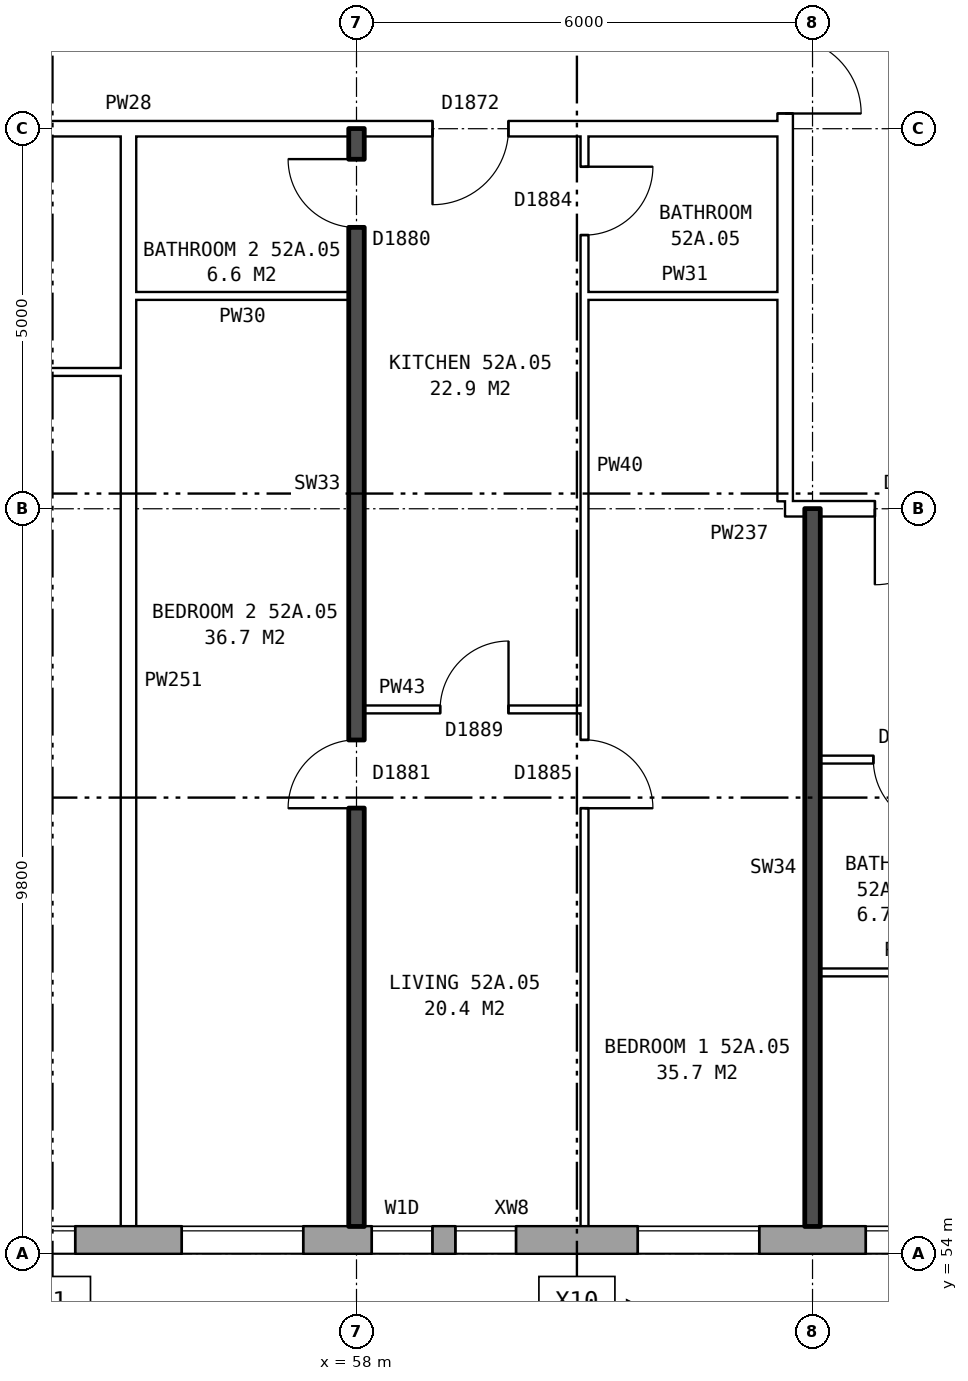
"""IFC4 building model, lengths in metres.
Left out: names, types, materials, properties, quantities, classifications, styles, units other than length and angle.
Written with IfcOpenShell. Run it as: python <this file> out.ifc"""

import sys

from ifc_helpers import new_model, si_unit, direction, frame, frame_2d, origin, place, context, subcontext, project, spatial, rectangle, extrude, element, fill, save


model = new_model("IFC4")
c1 = context("Model", 3, precision=1e-05, world=origin(), true_north=direction((0.0, 1.0)))
c2 = subcontext(c1, "Body", "Model", "MODEL_VIEW")
j1 = project(units=[si_unit("LENGTHUNIT", "METRE"), si_unit("PLANEANGLEUNIT", "RADIAN")], contexts=[c1])
p1 = place(None, origin())
s1 = spatial("IfcSite", under=j1, at=p1, CompositionType="ELEMENT")
p2 = place(p1, origin())
s2 = spatial("IfcBuilding", under=s1, at=p2, CompositionType="ELEMENT")
p3 = place(p2, frame((0.0, 0.0, 185.1)))
s3 = spatial("IfcBuildingStorey", under=s2, at=p3, CompositionType="ELEMENT", Elevation=185.1)
p4 = place(p3, frame((33.325, 54.18, 0.0), z_axis=(0.0, 0.0, 1.0), x_axis=(1.0, 0.0, 0.0)))
e1 = element("IfcWall", 1, at=p4, inside=s3, PredefinedType="STANDARD", context=c2, shape_type="SweptSolid", body=[
    extrude(rectangle(XDim=39.601, YDim=0.36, at=frame_2d((19.8, 0.0))), origin(), (0.0, 0.0, 1.0), 2.85),
])
p5 = place(p4, frame((1.375, 0.0, 0.8)))
e2 = element("IfcOpeningElement", 2, at=p5, cuts=e1, PredefinedType="OPENING", context=c2, shape_type="SweptSolid", body=[
    extrude(rectangle(XDim=1.6, YDim=1.8, at=frame_2d((0.8, 0.9))), frame((0.0, 0.19, 0.0), z_axis=(0.0, -1.0, 0.0), x_axis=(1.0, 0.0, 0.0)), (0.0, 0.0, 1.0), 0.38),
])
p6 = place(p4, frame((4.375, 0.0, 0.8)))
e3 = element("IfcOpeningElement", 3, at=p6, cuts=e1, PredefinedType="OPENING", context=c2, shape_type="SweptSolid", body=[
    extrude(rectangle(XDim=1.6, YDim=1.8, at=frame_2d((0.8, 0.9))), frame((0.0, 0.19, 0.0), z_axis=(0.0, -1.0, 0.0), x_axis=(1.0, 0.0, 0.0)), (0.0, 0.0, 1.0), 0.38),
])
p7 = place(p4, frame((7.375, 0.0, 0.8)))
e4 = element("IfcOpeningElement", 4, at=p7, cuts=e1, PredefinedType="OPENING", context=c2, shape_type="SweptSolid", body=[
    extrude(rectangle(XDim=1.6, YDim=1.8, at=frame_2d((0.8, 0.9))), frame((0.0, 0.19, 0.0), z_axis=(0.0, -1.0, 0.0), x_axis=(1.0, 0.0, 0.0)), (0.0, 0.0, 1.0), 0.38),
])
p8 = place(p4, frame((9.275, 0.0, 0.8)))
e5 = element("IfcOpeningElement", 5, at=p8, cuts=e1, PredefinedType="OPENING", context=c2, shape_type="SweptSolid", body=[
    extrude(rectangle(XDim=1.6, YDim=1.8, at=frame_2d((0.8, 0.9))), frame((0.0, 0.19, 0.0), z_axis=(0.0, -1.0, 0.0), x_axis=(1.0, 0.0, 0.0)), (0.0, 0.0, 1.0), 0.38),
])
p9 = place(p4, frame((13.075, 0.0, 0.8)))
e6 = element("IfcOpeningElement", 6, at=p9, cuts=e1, PredefinedType="OPENING", context=c2, shape_type="SweptSolid", body=[
    extrude(rectangle(XDim=0.6, YDim=0.9, at=frame_2d((0.3, 0.45))), frame((0.0, 0.19, 0.0), z_axis=(0.0, -1.0, 0.0), x_axis=(1.0, 0.0, 0.0)), (0.0, 0.0, 1.0), 0.38),
])
p10 = place(p4, frame((16.375, 0.0, 0.8)))
e7 = element("IfcOpeningElement", 7, at=p10, cuts=e1, PredefinedType="OPENING", context=c2, shape_type="SweptSolid", body=[
    extrude(rectangle(XDim=1.6, YDim=1.8, at=frame_2d((0.8, 0.9))), frame((0.0, 0.19, 0.0), z_axis=(0.0, -1.0, 0.0), x_axis=(1.0, 0.0, 0.0)), (0.0, 0.0, 1.0), 0.38),
])
p11 = place(p4, frame((19.375, 0.0, 0.8)))
e8 = element("IfcOpeningElement", 8, at=p11, cuts=e1, PredefinedType="OPENING", context=c2, shape_type="SweptSolid", body=[
    extrude(rectangle(XDim=1.6, YDim=1.8, at=frame_2d((0.8, 0.9))), frame((0.0, 0.19, 0.0), z_axis=(0.0, -1.0, 0.0), x_axis=(1.0, 0.0, 0.0)), (0.0, 0.0, 1.0), 0.38),
])
p12 = place(p4, frame((22.375, 0.0, 0.8)))
e9 = element("IfcOpeningElement", 9, at=p12, cuts=e1, PredefinedType="OPENING", context=c2, shape_type="SweptSolid", body=[
    extrude(rectangle(XDim=1.6, YDim=1.8, at=frame_2d((0.8, 0.9))), frame((0.0, 0.19, 0.0), z_axis=(0.0, -1.0, 0.0), x_axis=(1.0, 0.0, 0.0)), (0.0, 0.0, 1.0), 0.38),
])
p13 = place(p4, frame((24.875, 0.0, 0.75)))
e10 = element("IfcOpeningElement", 10, at=p13, cuts=e1, PredefinedType="OPENING", context=c2, shape_type="SweptSolid", body=[
    extrude(rectangle(XDim=0.8, YDim=1.8, at=frame_2d((0.4, 0.9))), frame((0.0, 0.19, 0.0), z_axis=(0.0, -1.0, 0.0), x_axis=(1.0, 0.0, 0.0)), (0.0, 0.0, 1.0), 0.38),
])
p14 = place(p4, frame((28.375, 0.0, 0.8)))
e11 = element("IfcOpeningElement", 11, at=p14, cuts=e1, PredefinedType="OPENING", context=c2, shape_type="SweptSolid", body=[
    extrude(rectangle(XDim=1.6, YDim=1.8, at=frame_2d((0.8, 0.9))), frame((0.0, 0.19, 0.0), z_axis=(0.0, -1.0, 0.0), x_axis=(1.0, 0.0, 0.0)), (0.0, 0.0, 1.0), 0.38),
])
p15 = place(p4, frame((31.375, 0.0, 0.8)))
e12 = element("IfcOpeningElement", 12, at=p15, cuts=e1, PredefinedType="OPENING", context=c2, shape_type="SweptSolid", body=[
    extrude(rectangle(XDim=1.6, YDim=1.8, at=frame_2d((0.8, 0.9))), frame((0.0, 0.19, 0.0), z_axis=(0.0, -1.0, 0.0), x_axis=(1.0, 0.0, 0.0)), (0.0, 0.0, 1.0), 0.38),
])
p16 = place(p4, frame((34.375, 0.0, 0.8)))
e13 = element("IfcOpeningElement", 13, at=p16, cuts=e1, PredefinedType="OPENING", context=c2, shape_type="SweptSolid", body=[
    extrude(rectangle(XDim=1.6, YDim=1.8, at=frame_2d((0.8, 0.9))), frame((0.0, 0.19, 0.0), z_axis=(0.0, -1.0, 0.0), x_axis=(1.0, 0.0, 0.0)), (0.0, 0.0, 1.0), 0.38),
])
p17 = place(p4, frame((37.375, 0.0, 0.8)))
e14 = element("IfcOpeningElement", 14, at=p17, cuts=e1, PredefinedType="OPENING", context=c2, shape_type="SweptSolid", body=[
    extrude(rectangle(XDim=1.6, YDim=1.8, at=frame_2d((0.8, 0.9))), frame((0.0, 0.19, 0.0), z_axis=(0.0, -1.0, 0.0), x_axis=(1.0, 0.0, 0.0)), (0.0, 0.0, 1.0), 0.38),
])
p18 = place(p4, frame((11.175, 0.0, 1.7)))
e15 = element("IfcOpeningElement", 15, at=p18, cuts=e1, PredefinedType="OPENING", context=c2, shape_type="SweptSolid", body=[
    extrude(rectangle(XDim=0.8, YDim=0.9, at=frame_2d((0.4, 0.45))), frame((0.0, 0.19, 0.0), z_axis=(0.0, -1.0, 0.0), x_axis=(1.0, 0.0, 0.0)), (0.0, 0.0, 1.0), 0.38),
])
p19 = place(p4, frame((13.975, 0.0, 0.8)))
e16 = element("IfcOpeningElement", 16, at=p19, cuts=e1, PredefinedType="OPENING", context=c2, shape_type="SweptSolid", body=[
    extrude(rectangle(XDim=1.4, YDim=1.8, at=frame_2d((0.7, 0.9))), frame((0.0, 0.19, 0.0), z_axis=(0.0, -1.0, 0.0), x_axis=(1.0, 0.0, 0.0)), (0.0, 0.0, 1.0), 0.38),
])
p20 = place(p4, frame((25.975, 0.0, 0.55)))
e17 = element("IfcOpeningElement", 17, at=p20, cuts=e1, PredefinedType="OPENING", context=c2, shape_type="SweptSolid", body=[
    extrude(rectangle(XDim=0.8, YDim=0.9, at=frame_2d((0.4, 0.45))), frame((0.0, 0.19, 0.0), z_axis=(0.0, -1.0, 0.0), x_axis=(1.0, 0.0, 0.0)), (0.0, 0.0, 1.0), 0.38),
])
p21 = place(p3, frame((63.64, 63.9, 0.0), z_axis=(0.0, 0.0, 1.0), x_axis=(0.0, 1.0, 0.0)))
e18 = element("IfcWall", 18, at=p21, inside=s3, PredefinedType="PARTITIONING", context=c2, shape_type="SweptSolid", body=[
    extrude(rectangle(XDim=12.2, YDim=0.2, at=frame_2d((6.1, 0.0))), origin(), (0.0, 0.0, 1.0), 2.85),
])
p22 = place(p21, frame((5.1, 0.0, 0.0)))
e19 = element("IfcOpeningElement", 19, at=p22, cuts=e18, PredefinedType="OPENING", context=c2, shape_type="SweptSolid", body=[
    extrude(rectangle(XDim=2.0, YDim=2.1, at=frame_2d((1.0, 1.05))), frame((0.0, 0.11, 0.0), z_axis=(0.0, -1.0, 0.0), x_axis=(1.0, 0.0, 0.0)), (0.0, 0.0, 1.0), 0.22),
])
p23 = place(p3, frame((64.1, 57.7, 0.0), z_axis=(0.0, 0.0, 1.0), x_axis=(1.0, 0.0, 0.0)))
e20 = element("IfcWall", 20, at=p23, inside=s3, PredefinedType="PARTITIONING", context=c2, shape_type="SweptSolid", body=[
    extrude(rectangle(XDim=2.3, YDim=0.1, at=frame_2d((1.15, 0.0))), origin(), (0.0, 0.0, 1.0), 2.85),
])
p24 = place(p3, frame((64.1, 60.5, 0.0), z_axis=(0.0, 0.0, 1.0), x_axis=(1.0, 0.0, 0.0)))
e21 = element("IfcWall", 21, at=p24, inside=s3, PredefinedType="PARTITIONING", context=c2, shape_type="SweptSolid", body=[
    extrude(rectangle(XDim=5.8, YDim=0.1, at=frame_2d((2.9, 0.0))), origin(), (0.0, 0.0, 1.0), 2.85),
])
p25 = place(p24, frame((3.6, 0.0, 0.0)))
e22 = element("IfcOpeningElement", 22, at=p25, cuts=e21, PredefinedType="OPENING", context=c2, shape_type="SweptSolid", body=[
    extrude(rectangle(XDim=0.9, YDim=2.1, at=frame_2d((0.45, 1.05))), frame((0.0, 0.06, 0.0), z_axis=(0.0, -1.0, 0.0), x_axis=(1.0, 0.0, 0.0)), (0.0, 0.0, 1.0), 0.12),
])
p26 = place(p24, frame((0.7, 0.0, 0.0)))
e23 = element("IfcOpeningElement", 23, at=p26, cuts=e21, PredefinedType="OPENING", context=c2, shape_type="SweptSolid", body=[
    extrude(rectangle(XDim=0.9, YDim=2.1, at=frame_2d((0.45, 1.05))), frame((0.0, 0.06, 0.0), z_axis=(0.0, -1.0, 0.0), x_axis=(1.0, 0.0, 0.0)), (0.0, 0.0, 1.0), 0.12),
])
p27 = place(p3, frame((58.1, 61.16, 0.0), z_axis=(0.0, 0.0, 1.0), x_axis=(1.0, 0.0, 0.0)))
e24 = element("IfcWall", 24, at=p27, inside=s3, PredefinedType="PARTITIONING", context=c2, shape_type="SweptSolid", body=[
    extrude(rectangle(XDim=2.9, YDim=0.1, at=frame_2d((1.45, 0.0))), origin(), (0.0, 0.0, 1.0), 2.85),
])
p28 = place(p27, frame((1.0, 0.0, 0.0)))
e25 = element("IfcOpeningElement", 25, at=p28, cuts=e24, PredefinedType="OPENING", context=c2, shape_type="SweptSolid", body=[
    extrude(rectangle(XDim=0.9, YDim=2.1, at=frame_2d((0.45, 1.05))), frame((0.0, 0.06, 0.0), z_axis=(0.0, -1.0, 0.0), x_axis=(1.0, 0.0, 0.0)), (0.0, 0.0, 1.0), 0.12),
])
p29 = place(p3, frame((63.64, 63.8, 0.0), z_axis=(0.0, 0.0, 1.0), x_axis=(1.0, 0.0, 0.0)))
e26 = element("IfcWall", 26, at=p29, inside=s3, PredefinedType="PARTITIONING", context=c2, shape_type="SweptSolid", body=[
    extrude(rectangle(XDim=3.0, YDim=0.2, at=frame_2d((1.5, 0.0))), origin(), (0.0, 0.0, 1.0), 2.85),
])
p30 = place(p29, frame((1.18, 0.0, 0.0)))
e27 = element("IfcOpeningElement", 27, at=p30, cuts=e26, PredefinedType="OPENING", context=c2, shape_type="SweptSolid", body=[
    extrude(rectangle(XDim=1.0, YDim=2.1, at=frame_2d((0.5, 1.05))), frame((0.0, 0.11, 0.0), z_axis=(0.0, -1.0, 0.0), x_axis=(1.0, 0.0, 0.0)), (0.0, 0.0, 1.0), 0.22),
])
for number, where, z_axis, x_axis in (
    (28, (52.1, 65.6, 0.0), (0.0, 0.0, 1.0), (1.0, 0.0, 0.0)),
    (29, (55.1, 66.6, 0.0), (0.0, 0.0, 1.0), (1.0, 0.0, 0.0)),
):
    element("IfcWall", number, at=place(p3, frame(where, z_axis=z_axis, x_axis=x_axis)), inside=s3, PredefinedType="PARTITIONING", context=c2, shape_type="SweptSolid", body=[
        extrude(rectangle(XDim=2.8, YDim=0.1, at=frame_2d((1.4, 0.0))), origin(), (0.0, 0.0, 1.0), 2.85),
    ])
p31 = place(p3, frame((61.0, 66.6, 0.0), z_axis=(0.0, 0.0, 1.0), x_axis=(1.0, 0.0, 0.0)))
e30 = element("IfcWall", 30, at=p31, inside=s3, PredefinedType="PARTITIONING", context=c2, shape_type="SweptSolid", body=[
    extrude(rectangle(XDim=2.64, YDim=0.1, at=frame_2d((1.32, 0.0))), origin(), (0.0, 0.0, 1.0), 2.85),
])
p32 = place(p3, frame((44.36, 68.8, 0.0), z_axis=(0.0, 0.0, 1.0), x_axis=(1.0, 0.0, 0.0)))
e31 = element("IfcWall", 31, at=p32, inside=s3, PredefinedType="PARTITIONING", context=c2, shape_type="SweptSolid", body=[
    extrude(rectangle(XDim=19.28, YDim=0.2, at=frame_2d((9.64, 0.0))), origin(), (0.0, 0.0, 1.0), 2.85),
])
p33 = place(p32, frame((14.64, 0.0, 0.0)))
e32 = element("IfcOpeningElement", 32, at=p33, cuts=e31, PredefinedType="OPENING", context=c2, shape_type="SweptSolid", body=[
    extrude(rectangle(XDim=1.0, YDim=2.1, at=frame_2d((0.5, 1.05))), frame((0.0, 0.11, 0.0), z_axis=(0.0, -1.0, 0.0), x_axis=(1.0, 0.0, 0.0)), (0.0, 0.0, 1.0), 0.22),
])
p34 = place(p32, frame((5.64, 0.0, 0.0)))
e33 = element("IfcOpeningElement", 33, at=p34, cuts=e31, PredefinedType="OPENING", context=c2, shape_type="SweptSolid", body=[
    extrude(rectangle(XDim=1.0, YDim=2.1, at=frame_2d((0.5, 1.05))), frame((0.0, 0.11, 0.0), z_axis=(0.0, -1.0, 0.0), x_axis=(1.0, 0.0, 0.0)), (0.0, 0.0, 1.0), 0.22),
])
p35 = place(p3, frame((55.0, 54.36, 0.0), z_axis=(0.0, 0.0, 1.0), x_axis=(0.0, 1.0, 0.0)))
e34 = element("IfcWall", 34, at=p35, inside=s3, PredefinedType="PARTITIONING", context=c2, shape_type="SweptSolid", body=[
    extrude(rectangle(XDim=14.34, YDim=0.2, at=frame_2d((7.17, 0.0))), origin(), (0.0, 0.0, 1.0), 2.85),
])
p36 = place(p3, frame((58.0, 54.36, 0.0), z_axis=(0.0, 0.0, 1.0), x_axis=(0.0, 1.0, 0.0)))
e35 = element("IfcWall", 35, at=p36, inside=s3, PredefinedType="SOLIDWALL", context=c2, shape_type="SweptSolid", body=[
    extrude(rectangle(XDim=14.44, YDim=0.2, at=frame_2d((7.22, 0.0))), origin(), (0.0, 0.0, 1.0), 2.85),
])
p37 = place(p36, frame((5.5, 0.0, 0.0)))
e36 = element("IfcOpeningElement", 36, at=p37, cuts=e35, PredefinedType="OPENING", context=c2, shape_type="SweptSolid", body=[
    extrude(rectangle(XDim=0.9, YDim=2.1, at=frame_2d((0.45, 1.05))), frame((0.0, 0.11, 0.0), z_axis=(0.0, -1.0, 0.0), x_axis=(1.0, 0.0, 0.0)), (0.0, 0.0, 1.0), 0.22),
])
p38 = place(p36, frame((13.14, 0.0, 0.0)))
e37 = element("IfcOpeningElement", 37, at=p38, cuts=e35, PredefinedType="OPENING", context=c2, shape_type="SweptSolid", body=[
    extrude(rectangle(XDim=0.9, YDim=2.1, at=frame_2d((0.45, 1.05))), frame((0.0, 0.11, 0.0), z_axis=(0.0, -1.0, 0.0), x_axis=(1.0, 0.0, 0.0)), (0.0, 0.0, 1.0), 0.22),
])
p39 = place(p3, frame((61.0, 54.36, 0.0), z_axis=(0.0, 0.0, 1.0), x_axis=(0.0, 1.0, 0.0)))
e38 = element("IfcWall", 38, at=p39, inside=s3, PredefinedType="PARTITIONING", context=c2, shape_type="SweptSolid", body=[
    extrude(rectangle(XDim=14.34, YDim=0.1, at=frame_2d((7.17, 0.0))), origin(), (0.0, 0.0, 1.0), 2.85),
])
p40 = place(p39, frame((5.5, 0.0, 0.0)))
e39 = element("IfcOpeningElement", 39, at=p40, cuts=e38, PredefinedType="OPENING", context=c2, shape_type="SweptSolid", body=[
    extrude(rectangle(XDim=0.9, YDim=2.1, at=frame_2d((0.45, 1.05))), frame((0.0, 0.06, 0.0), z_axis=(0.0, -1.0, 0.0), x_axis=(1.0, 0.0, 0.0)), (0.0, 0.0, 1.0), 0.12),
])
p41 = place(p39, frame((13.04, 0.0, 0.0)))
e40 = element("IfcOpeningElement", 40, at=p41, cuts=e38, PredefinedType="OPENING", context=c2, shape_type="SweptSolid", body=[
    extrude(rectangle(XDim=0.9, YDim=2.1, at=frame_2d((0.45, 1.05))), frame((0.0, 0.06, 0.0), z_axis=(0.0, -1.0, 0.0), x_axis=(1.0, 0.0, 0.0)), (0.0, 0.0, 1.0), 0.12),
])
p42 = place(p3, frame((64.0, 54.36, 0.0), z_axis=(0.0, 0.0, 1.0), x_axis=(0.0, 1.0, 0.0)))
e41 = element("IfcWall", 41, at=p42, inside=s3, PredefinedType="SOLIDWALL", context=c2, shape_type="SweptSolid", body=[
    extrude(rectangle(XDim=9.44, YDim=0.2, at=frame_2d((4.72, 0.0))), origin(), (0.0, 0.0, 1.0), 2.85),
])
p43 = place(p11, origin())
e42 = element("IfcWindow", 42, at=p43, inside=s3, PartitioningType="SINGLE_PANEL", PredefinedType="WINDOW", context=c2, shape_type="SweptSolid", body=[
    extrude(rectangle(XDim=1.6, YDim=1.8, at=frame_2d((0.8, 0.9))), frame((0.0, 0.15, 0.0), z_axis=(0.0, -1.0, 0.0), x_axis=(1.0, 0.0, 0.0)), (0.0, 0.0, 1.0), 0.06),
])
fill(e8, e42)
p44 = place(p12, origin())
e43 = element("IfcWindow", 43, at=p44, inside=s3, PartitioningType="SINGLE_PANEL", PredefinedType="WINDOW", context=c2, shape_type="SweptSolid", body=[
    extrude(rectangle(XDim=1.6, YDim=1.8, at=frame_2d((0.8, 0.9))), frame((0.0, 0.15, 0.0), z_axis=(0.0, -1.0, 0.0), x_axis=(1.0, 0.0, 0.0)), (0.0, 0.0, 1.0), 0.06),
])
fill(e9, e43)
p45 = place(p13, origin())
e44 = element("IfcWindow", 44, at=p45, inside=s3, PartitioningType="SINGLE_PANEL", PredefinedType="WINDOW", context=c2, shape_type="SweptSolid", body=[
    extrude(rectangle(XDim=0.8, YDim=1.8, at=frame_2d((0.4, 0.9))), frame((0.0, 0.15, 0.0), z_axis=(0.0, -1.0, 0.0), x_axis=(1.0, 0.0, 0.0)), (0.0, 0.0, 1.0), 0.06),
])
fill(e10, e44)
p46 = place(p14, origin())
e45 = element("IfcWindow", 45, at=p46, inside=s3, PartitioningType="SINGLE_PANEL", PredefinedType="WINDOW", context=c2, shape_type="SweptSolid", body=[
    extrude(rectangle(XDim=1.6, YDim=1.8, at=frame_2d((0.8, 0.9))), frame((0.0, 0.15, 0.0), z_axis=(0.0, -1.0, 0.0), x_axis=(1.0, 0.0, 0.0)), (0.0, 0.0, 1.0), 0.06),
])
fill(e11, e45)
p47 = place(p15, origin())
e46 = element("IfcWindow", 46, at=p47, inside=s3, PartitioningType="SINGLE_PANEL", PredefinedType="WINDOW", context=c2, shape_type="SweptSolid", body=[
    extrude(rectangle(XDim=1.6, YDim=1.8, at=frame_2d((0.8, 0.9))), frame((0.0, 0.15, 0.0), z_axis=(0.0, -1.0, 0.0), x_axis=(1.0, 0.0, 0.0)), (0.0, 0.0, 1.0), 0.06),
])
fill(e12, e46)
p48 = place(p22, frame((2.0, 0.0, 0.0), z_axis=(0.0, 0.0, 1.0), x_axis=(-1.0, 0.0, 0.0)))
e47 = element("IfcDoor", 47, at=p48, inside=s3, OperationType="DOUBLE_DOOR_SINGLE_SWING", PredefinedType="DOOR", context=c2, shape_type="SweptSolid", body=[
    extrude(rectangle(XDim=2.0, YDim=2.1, at=frame_2d((1.0, 1.05))), frame((0.0, 0.025, 0.0), z_axis=(0.0, -1.0, 0.0), x_axis=(1.0, 0.0, 0.0)), (0.0, 0.0, 1.0), 0.05),
])
fill(e19, e47)
p49 = place(p30, frame((1.0, 0.0, 0.0), z_axis=(0.0, 0.0, 1.0), x_axis=(-1.0, 0.0, 0.0)))
e48 = element("IfcDoor", 48, at=p49, inside=s3, OperationType="SINGLE_SWING_RIGHT", PredefinedType="DOOR", context=c2, shape_type="SweptSolid", body=[
    extrude(rectangle(XDim=1.0, YDim=2.1, at=frame_2d((0.5, 1.05))), frame((0.0, 0.025, 0.0), z_axis=(0.0, -1.0, 0.0), x_axis=(1.0, 0.0, 0.0)), (0.0, 0.0, 1.0), 0.05),
])
fill(e27, e48)
p50 = place(p26, frame((0.9, 0.0, 0.0), z_axis=(0.0, 0.0, 1.0), x_axis=(-1.0, 0.0, 0.0)))
e49 = element("IfcDoor", 49, at=p50, inside=s3, OperationType="SINGLE_SWING_LEFT", PredefinedType="DOOR", context=c2, shape_type="SweptSolid", body=[
    extrude(rectangle(XDim=0.9, YDim=2.1, at=frame_2d((0.45, 1.05))), frame((0.0, 0.025, 0.0), z_axis=(0.0, -1.0, 0.0), x_axis=(1.0, 0.0, 0.0)), (0.0, 0.0, 1.0), 0.05),
])
fill(e23, e49)
p51 = place(p40, frame((0.9, 0.0, 0.0), z_axis=(0.0, 0.0, 1.0), x_axis=(-1.0, 0.0, 0.0)))
e50 = element("IfcDoor", 50, at=p51, inside=s3, OperationType="SINGLE_SWING_RIGHT", PredefinedType="DOOR", context=c2, shape_type="SweptSolid", body=[
    extrude(rectangle(XDim=0.9, YDim=2.1, at=frame_2d((0.45, 1.05))), frame((0.0, 0.025, 0.0), z_axis=(0.0, -1.0, 0.0), x_axis=(1.0, 0.0, 0.0)), (0.0, 0.0, 1.0), 0.05),
])
fill(e39, e50)
p52 = place(p37, origin())
e51 = element("IfcDoor", 51, at=p52, inside=s3, OperationType="SINGLE_SWING_LEFT", PredefinedType="DOOR", context=c2, shape_type="SweptSolid", body=[
    extrude(rectangle(XDim=0.9, YDim=2.1, at=frame_2d((0.45, 1.05))), frame((0.0, 0.025, 0.0), z_axis=(0.0, -1.0, 0.0), x_axis=(1.0, 0.0, 0.0)), (0.0, 0.0, 1.0), 0.05),
])
fill(e36, e51)
p53 = place(p33, frame((1.0, 0.0, 0.0), z_axis=(0.0, 0.0, 1.0), x_axis=(-1.0, 0.0, 0.0)))
e52 = element("IfcDoor", 52, at=p53, inside=s3, OperationType="SINGLE_SWING_RIGHT", PredefinedType="DOOR", context=c2, shape_type="SweptSolid", body=[
    extrude(rectangle(XDim=1.0, YDim=2.1, at=frame_2d((0.5, 1.05))), frame((0.0, 0.025, 0.0), z_axis=(0.0, -1.0, 0.0), x_axis=(1.0, 0.0, 0.0)), (0.0, 0.0, 1.0), 0.05),
])
fill(e32, e52)
p54 = place(p28, origin())
e53 = element("IfcDoor", 53, at=p54, inside=s3, OperationType="SINGLE_SWING_RIGHT", PredefinedType="DOOR", context=c2, shape_type="SweptSolid", body=[
    extrude(rectangle(XDim=0.9, YDim=2.1, at=frame_2d((0.45, 1.05))), frame((0.0, 0.025, 0.0), z_axis=(0.0, -1.0, 0.0), x_axis=(1.0, 0.0, 0.0)), (0.0, 0.0, 1.0), 0.05),
])
fill(e25, e53)
p55 = place(p41, frame((0.9, 0.0, 0.0), z_axis=(0.0, 0.0, 1.0), x_axis=(-1.0, 0.0, 0.0)))
e54 = element("IfcDoor", 54, at=p55, inside=s3, OperationType="SINGLE_SWING_LEFT", PredefinedType="DOOR", context=c2, shape_type="SweptSolid", body=[
    extrude(rectangle(XDim=0.9, YDim=2.1, at=frame_2d((0.45, 1.05))), frame((0.0, 0.025, 0.0), z_axis=(0.0, -1.0, 0.0), x_axis=(1.0, 0.0, 0.0)), (0.0, 0.0, 1.0), 0.05),
])
fill(e40, e54)
p56 = place(p38, origin())
e55 = element("IfcDoor", 55, at=p56, inside=s3, OperationType="SINGLE_SWING_RIGHT", PredefinedType="DOOR", context=c2, shape_type="SweptSolid", body=[
    extrude(rectangle(XDim=0.9, YDim=2.1, at=frame_2d((0.45, 1.05))), frame((0.0, 0.025, 0.0), z_axis=(0.0, -1.0, 0.0), x_axis=(1.0, 0.0, 0.0)), (0.0, 0.0, 1.0), 0.05),
])
fill(e37, e55)
p57 = place(p20, origin())
e56 = element("IfcWindow", 56, at=p57, inside=s3, PartitioningType="SINGLE_PANEL", PredefinedType="WINDOW", context=c2, shape_type="SweptSolid", body=[
    extrude(rectangle(XDim=0.8, YDim=0.9, at=frame_2d((0.4, 0.45))), frame((0.0, 0.15, 0.0), z_axis=(0.0, -1.0, 0.0), x_axis=(1.0, 0.0, 0.0)), (0.0, 0.0, 1.0), 0.06),
])
fill(e17, e56)
save(model, sys.argv[1])
